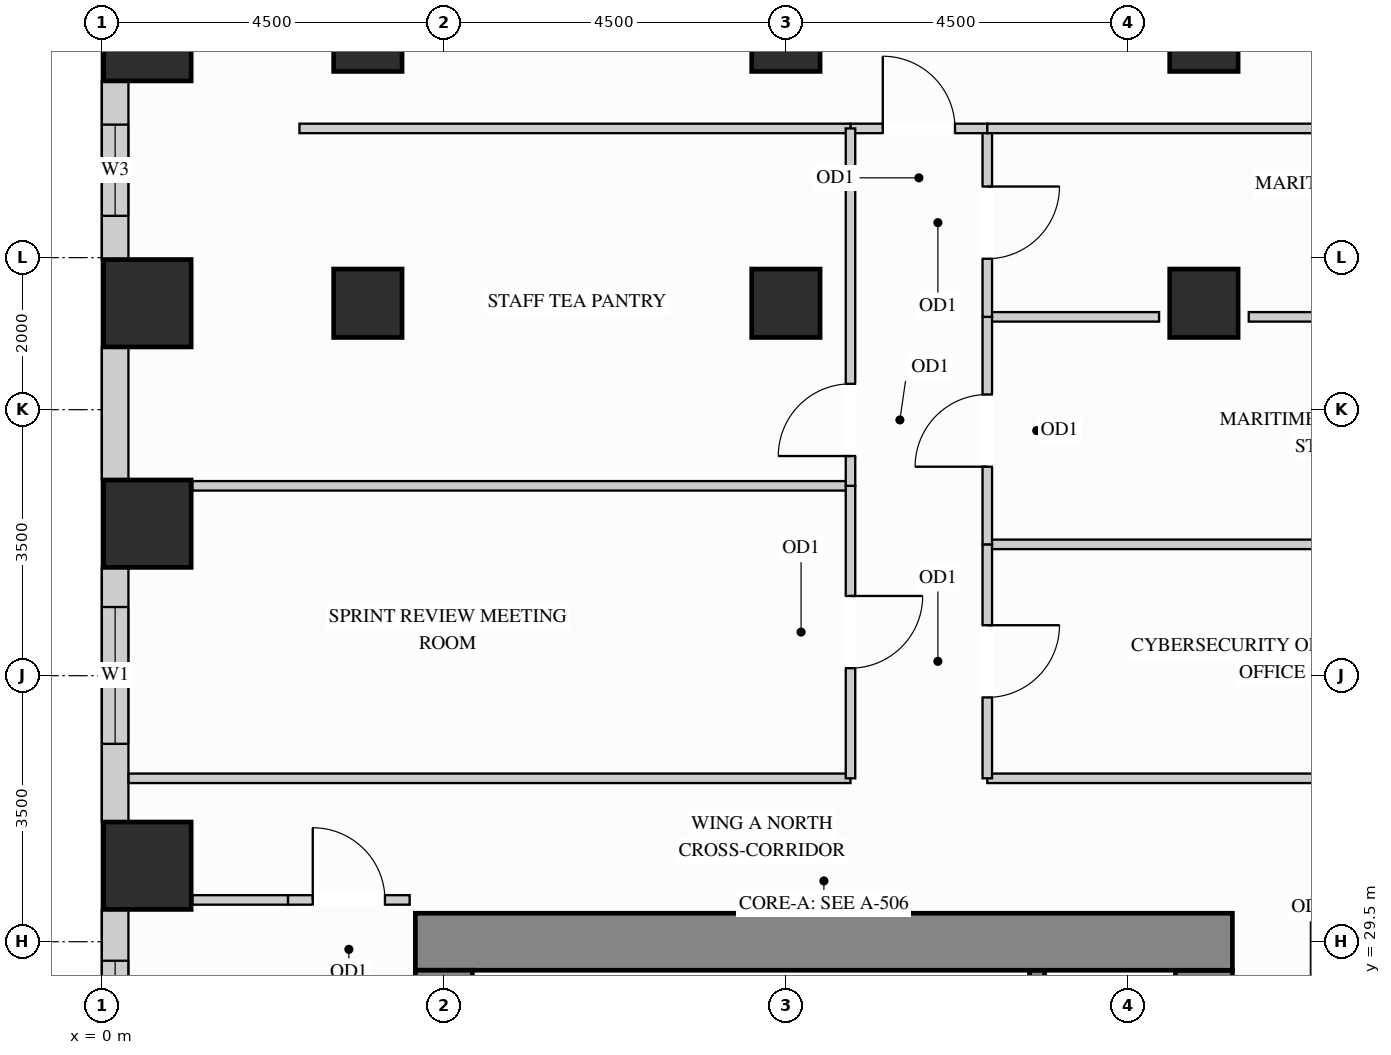
"""IFC4 building model, lengths in metres.
Left out: names, types, materials, properties, quantities, classifications, styles, units other than length and angle.
Written with IfcOpenShell. Run it as: python <this file> out.ifc"""

import sys

from ifc_helpers import new_model, si_unit, direction, frame, frame_2d, origin, origin_2d, place, context, subcontext, project, spatial, rectangle, extrude, source, transform, mapped, element, fill, save


model = new_model("IFC4")
c1 = context("Model", 3, precision=1e-05, world=origin(), true_north=direction((0.0, 1.0)))
c2 = subcontext(c1, "Body", "Model", "MODEL_VIEW")
j1 = project(units=[si_unit("LENGTHUNIT", "METRE"), si_unit("PLANEANGLEUNIT", "RADIAN")], contexts=[c1])
p1 = place(None, origin())
s1 = spatial("IfcSite", under=j1, at=p1, CompositionType="ELEMENT")
p2 = place(p1, origin())
s2 = spatial("IfcBuilding", under=s1, at=p2, CompositionType="ELEMENT")
p3 = place(p2, frame((0.0, 0.0, 127.8)))
s3 = spatial("IfcBuildingStorey", under=s2, at=p3, CompositionType="ELEMENT", Elevation=127.8)
m1 = source(origin(), c2, "Body", "SweptSolid", [
    extrude(rectangle(XDim=0.9, YDim=0.9, at=origin_2d()), origin(), (0.0, 0.0, 1.0), 3.38),
])
for number, where, z_axis, x_axis in (
    (1, (14.5, 37.9, 0.0), (0.0, 0.0, 1.0), (1.0, 0.0, 0.0)),
    (2, (14.5, 41.4, 0.0), (0.0, 0.0, 1.0), (1.0, 0.0, 0.0)),
    (3, (3.5, 37.9, 0.0), (0.0, 0.0, 1.0), (1.0, 0.0, 0.0)),
    (4, (3.5, 41.4, 0.0), (0.0, 0.0, 1.0), (1.0, 0.0, 0.0)),
    (5, (9.0, 37.9, 0.0), (0.0, 0.0, 1.0), (1.0, 0.0, 0.0)),
    (6, (9.0, 41.4, 0.0), (0.0, 0.0, 1.0), (1.0, 0.0, 0.0)),
):
    element("IfcColumn", number, at=place(p3, frame(where, z_axis=z_axis, x_axis=x_axis)), inside=s3, PredefinedType="COLUMN", context=c2, shape_type="MappedRepresentation", body=[
        mapped(m1, transform((0.0, 0.0, 0.0), x_axis=(1.0, 0.0, 0.0), y_axis=(0.0, 1.0, 0.0), z_axis=(0.0, 0.0, 1.0))),
    ])
m2 = source(origin(), c2, "Body", "SweptSolid", [
    extrude(rectangle(XDim=1.15, YDim=1.15, at=origin_2d()), origin(), (0.0, 0.0, 1.0), 3.38),
])
for number, where, z_axis, x_axis in (
    (7, (0.6, 30.5, 0.0), (0.0, 0.0, 1.0), (1.0, 0.0, 0.0)),
    (8, (0.6, 35.0, 0.0), (0.0, 0.0, 1.0), (1.0, 0.0, 0.0)),
    (9, (0.6, 37.9, 0.0), (0.0, 0.0, 1.0), (1.0, 0.0, 0.0)),
    (10, (0.6, 41.4, 0.0), (0.0, 0.0, 1.0), (1.0, 0.0, 0.0)),
):
    element("IfcColumn", number, at=place(p3, frame(where, z_axis=z_axis, x_axis=x_axis)), inside=s3, PredefinedType="COLUMN", context=c2, shape_type="MappedRepresentation", body=[
        mapped(m2, transform((0.0, 0.0, 0.0), x_axis=(1.0, 0.0, 0.0), y_axis=(0.0, 1.0, 0.0), z_axis=(0.0, 0.0, 1.0))),
    ])
m3 = source(origin(), c2, "Body", "SweptSolid", [
    extrude(rectangle(XDim=8.245, YDim=0.75, at=frame_2d((4.123, 0.0))), origin(), (0.0, 0.0, 1.0), 3.38),
])
p4 = place(p3, frame((14.5, 20.88, 0.0), z_axis=(0.0, 0.0, 1.0), x_axis=(0.0, 1.0, 0.0)))
e11 = element("IfcWall", 11, at=p4, inside=s3, PredefinedType="SHEAR", context=c2, shape_type="MappedRepresentation", body=[
    mapped(m3, transform((0.0, 0.0, 0.0), x_axis=(1.0, 0.0, 0.0), y_axis=(0.0, 1.0, 0.0), z_axis=(0.0, 0.0, 1.0))),
])
m4 = source(origin(), c2, "Body", "SweptSolid", [
    extrude(rectangle(XDim=10.75, YDim=0.75, at=frame_2d((5.375, 0.0))), origin(), (0.0, 0.0, 1.0), 3.38),
])
p5 = place(p3, frame((4.125, 29.5, 0.0), z_axis=(0.0, 0.0, 1.0), x_axis=(1.0, 0.0, 0.0)))
e12 = element("IfcWall", 12, at=p5, inside=s3, PredefinedType="SHEAR", context=c2, shape_type="MappedRepresentation", body=[
    mapped(m4, transform((0.0, 0.0, 0.0), x_axis=(1.0, 0.0, 0.0), y_axis=(0.0, 1.0, 0.0), z_axis=(0.0, 0.0, 1.0))),
])
m5 = source(origin(), c2, "Body", "SweptSolid", [
    extrude(rectangle(XDim=20.25, YDim=0.75, at=frame_2d((10.125, 0.0))), origin(), (0.0, 0.0, 1.0), 3.38),
])
p6 = place(p3, frame((4.5, 8.875, 0.0), z_axis=(0.0, 0.0, 1.0), x_axis=(0.0, 1.0, 0.0)))
e13 = element("IfcWall", 13, at=p6, inside=s3, PredefinedType="SHEAR", context=c2, shape_type="MappedRepresentation", body=[
    mapped(m5, transform((0.0, 0.0, 0.0), x_axis=(1.0, 0.0, 0.0), y_axis=(0.0, 1.0, 0.0), z_axis=(0.0, 0.0, 1.0))),
])
p7 = place(p3, frame((0.175, 40.827, 0.0), z_axis=(0.0, 0.0, 1.0), x_axis=(0.0, -1.0, 0.0)))
e14 = element("IfcWall", 14, at=p7, inside=s3, PredefinedType="SOLIDWALL", context=c2, shape_type="SweptSolid", body=[
    extrude(rectangle(XDim=2.354, YDim=0.35, at=frame_2d((1.177, 0.0))), origin(), (0.0, 0.0, 1.0), 3.365),
])
p8 = place(p7, frame((0.577, 0.0, 0.78)))
e15 = element("IfcOpeningElement", 15, at=p8, cuts=e14, PredefinedType="OPENING", context=c2, shape_type="SweptSolid", body=[
    extrude(rectangle(XDim=1.2, YDim=2.1, at=frame_2d((0.6, 1.05))), frame((0.0, 0.185, 0.0), z_axis=(0.0, -1.0, 0.0), x_axis=(1.0, 0.0, 0.0)), (0.0, 0.0, 1.0), 0.37),
])
m6 = source(origin(), c2, "Body", "SweptSolid", [
    extrude(rectangle(XDim=1.754, YDim=0.35, at=frame_2d((0.877, 0.0))), origin(), (0.0, 0.0, 1.0), 3.365),
])
p9 = place(p3, frame((0.175, 37.327, 0.0), z_axis=(0.0, 0.0, 1.0), x_axis=(0.0, -1.0, 0.0)))
e16 = element("IfcWall", 16, at=p9, inside=s3, PredefinedType="SOLIDWALL", context=c2, shape_type="MappedRepresentation", body=[
    mapped(m6, transform((0.0, 0.0, 0.0), x_axis=(1.0, 0.0, 0.0), y_axis=(0.0, 1.0, 0.0), z_axis=(0.0, 0.0, 1.0))),
])
p10 = place(p3, frame((0.175, 34.427, 0.0), z_axis=(0.0, 0.0, 1.0), x_axis=(0.0, -1.0, 0.0)))
e17 = element("IfcWall", 17, at=p10, inside=s3, PredefinedType="SOLIDWALL", context=c2, shape_type="SweptSolid", body=[
    extrude(rectangle(XDim=3.354, YDim=0.35, at=frame_2d((1.677, 0.0))), origin(), (0.0, 0.0, 1.0), 3.365),
])
p11 = place(p10, frame((0.523, 0.0, 0.78)))
e18 = element("IfcOpeningElement", 18, at=p11, cuts=e17, PredefinedType="OPENING", context=c2, shape_type="SweptSolid", body=[
    extrude(rectangle(XDim=1.8, YDim=2.1, at=frame_2d((0.9, 1.05))), frame((0.0, 0.185, 0.0), z_axis=(0.0, -1.0, 0.0), x_axis=(1.0, 0.0, 0.0)), (0.0, 0.0, 1.0), 0.37),
])
p12 = place(p3, frame((0.175, 29.927, 0.0), z_axis=(0.0, 0.0, 1.0), x_axis=(0.0, -1.0, 0.0)))
e19 = element("IfcWall", 19, at=p12, inside=s3, PredefinedType="SOLIDWALL", context=c2, shape_type="SweptSolid", body=[
    extrude(rectangle(XDim=2.554, YDim=0.35, at=frame_2d((1.277, 0.0))), origin(), (0.0, 0.0, 1.0), 3.365),
])
p13 = place(p12, frame((0.677, 0.0, 0.78)))
e20 = element("IfcOpeningElement", 20, at=p13, cuts=e19, PredefinedType="OPENING", context=c2, shape_type="SweptSolid", body=[
    extrude(rectangle(XDim=1.2, YDim=2.1, at=frame_2d((0.6, 1.05))), frame((0.0, 0.185, 0.0), z_axis=(0.0, -1.0, 0.0), x_axis=(1.0, 0.0, 0.0)), (0.0, 0.0, 1.0), 0.37),
])
m7 = source(origin(), c2, "Body", "SweptSolid", [
    extrude(rectangle(XDim=6.76, YDim=0.125, at=frame_2d((3.38, 0.0))), origin(), (0.0, 0.0, 1.0), 3.365),
])
p14 = place(p3, frame((11.65, 34.728, 0.0), z_axis=(0.0, 0.0, 1.0), x_axis=(1.0, 0.0, 0.0)))
e21 = element("IfcWall", 21, at=p14, inside=s3, PredefinedType="PARTITIONING", context=c2, shape_type="MappedRepresentation", body=[
    mapped(m7, transform((0.0, 0.0, 0.0), x_axis=(1.0, 0.0, 0.0), y_axis=(0.0, 1.0, 0.0), z_axis=(0.0, 0.0, 1.0))),
])
m8 = source(origin(), c2, "Body", "SweptSolid", [
    extrude(rectangle(XDim=2.26, YDim=0.125, at=frame_2d((1.13, 0.0))), origin(), (0.0, 0.0, 1.0), 2.677),
])
p15 = place(p3, frame((11.65, 37.721, 0.0), z_axis=(0.0, 0.0, 1.0), x_axis=(1.0, 0.0, 0.0)))
e22 = element("IfcWall", 22, at=p15, inside=s3, PredefinedType="PARTITIONING", context=c2, shape_type="MappedRepresentation", body=[
    mapped(m8, transform((0.0, 0.0, 0.0), x_axis=(1.0, 0.0, 0.0), y_axis=(0.0, 1.0, 0.0), z_axis=(0.0, 0.0, 1.0))),
])
m9 = source(origin(), c2, "Body", "SweptSolid", [
    extrude(rectangle(XDim=3.32, YDim=0.125, at=frame_2d((1.66, 0.0))), origin(), (0.0, 0.0, 1.0), 2.677),
])
p16 = place(p3, frame((15.09, 37.721, 0.0), z_axis=(0.0, 0.0, 1.0), x_axis=(1.0, 0.0, 0.0)))
e23 = element("IfcWall", 23, at=p16, inside=s3, PredefinedType="PARTITIONING", context=c2, shape_type="MappedRepresentation", body=[
    mapped(m9, transform((0.0, 0.0, 0.0), x_axis=(1.0, 0.0, 0.0), y_axis=(0.0, 1.0, 0.0), z_axis=(0.0, 0.0, 1.0))),
])
m10 = source(origin(), c2, "Body", "SweptSolid", [
    extrude(rectangle(XDim=7.498, YDim=0.125, at=frame_2d((3.749, 0.0))), origin(), (0.0, 0.0, 1.0), 2.828),
])
p17 = place(p3, frame((11.65, 31.65, 0.0), z_axis=(0.0, 0.0, 1.0), x_axis=(1.0, 0.0, 0.0)))
e24 = element("IfcWall", 24, at=p17, inside=s3, PredefinedType="PARTITIONING", context=c2, shape_type="MappedRepresentation", body=[
    mapped(m10, transform((0.0, 0.0, 0.0), x_axis=(1.0, 0.0, 0.0), y_axis=(0.0, 1.0, 0.0), z_axis=(0.0, 0.0, 1.0))),
])
m11 = source(origin(), c2, "Body", "SweptSolid", [
    extrude(rectangle(XDim=9.498, YDim=0.125, at=frame_2d((4.749, 0.0))), origin(), (0.0, 0.0, 1.0), 2.828),
])
p18 = place(p3, frame((0.352, 31.65, 0.0), z_axis=(0.0, 0.0, 1.0), x_axis=(1.0, 0.0, 0.0)))
e25 = element("IfcWall", 25, at=p18, inside=s3, PredefinedType="PARTITIONING", context=c2, shape_type="MappedRepresentation", body=[
    mapped(m11, transform((0.0, 0.0, 0.0), x_axis=(1.0, 0.0, 0.0), y_axis=(0.0, 1.0, 0.0), z_axis=(0.0, 0.0, 1.0))),
])
m12 = source(origin(), c2, "Body", "SweptSolid", [
    extrude(rectangle(XDim=8.66, YDim=0.125, at=frame_2d((4.33, 0.0))), origin(), (0.0, 0.0, 1.0), 3.365),
])
p19 = place(p3, frame((1.19, 35.498, 0.0), z_axis=(0.0, 0.0, 1.0), x_axis=(1.0, 0.0, 0.0)))
e26 = element("IfcWall", 26, at=p19, inside=s3, PredefinedType="PARTITIONING", context=c2, shape_type="MappedRepresentation", body=[
    mapped(m12, transform((0.0, 0.0, 0.0), x_axis=(1.0, 0.0, 0.0), y_axis=(0.0, 1.0, 0.0), z_axis=(0.0, 0.0, 1.0))),
])
m13 = source(origin(), c2, "Body", "SweptSolid", [
    extrude(rectangle(XDim=1.26, YDim=0.125, at=frame_2d((0.63, 0.0))), origin(), (0.0, 0.0, 1.0), 3.365),
])
p20 = place(p3, frame((1.19, 30.05, 0.0), z_axis=(0.0, 0.0, 1.0), x_axis=(1.0, 0.0, 0.0)))
e27 = element("IfcWall", 27, at=p20, inside=s3, PredefinedType="PARTITIONING", context=c2, shape_type="MappedRepresentation", body=[
    mapped(m13, transform((0.0, 0.0, 0.0), x_axis=(1.0, 0.0, 0.0), y_axis=(0.0, 1.0, 0.0), z_axis=(0.0, 0.0, 1.0))),
])
p21 = place(p3, frame((2.45, 30.05, 0.0), z_axis=(0.0, 0.0, 1.0), x_axis=(1.0, 0.0, 0.0)))
e28 = element("IfcWall", 28, at=p21, inside=s3, PredefinedType="PARTITIONING", context=c2, shape_type="SweptSolid", body=[
    extrude(rectangle(XDim=1.6, YDim=0.125, at=frame_2d((0.8, 0.0))), origin(), (0.0, 0.0, 1.0), 3.365),
])
p22 = place(p21, frame((0.325, 0.0, 0.0)))
e29 = element("IfcOpeningElement", 29, at=p22, cuts=e28, PredefinedType="OPENING", context=c2, shape_type="SweptSolid", body=[
    extrude(rectangle(XDim=0.95, YDim=2.15, at=frame_2d((0.475, 1.075))), frame((0.0, 0.073, 0.0), z_axis=(0.0, -1.0, 0.0), x_axis=(1.0, 0.0, 0.0)), (0.0, 0.0, 1.0), 0.145),
])
p23 = place(p3, frame((11.65, 31.65, 0.0), z_axis=(0.0, 0.0, 1.0), x_axis=(0.0, 1.0, 0.0)))
e30 = element("IfcWall", 30, at=p23, inside=s3, PredefinedType="PARTITIONING", context=c2, shape_type="SweptSolid", body=[
    extrude(rectangle(XDim=3.078, YDim=0.125, at=frame_2d((1.539, 0.0))), origin(), (0.0, 0.0, 1.0), 3.365),
])
p24 = place(p23, frame((1.064, 0.0, 0.0)))
e31 = element("IfcOpeningElement", 31, at=p24, cuts=e30, PredefinedType="OPENING", context=c2, shape_type="SweptSolid", body=[
    extrude(rectangle(XDim=0.95, YDim=2.15, at=frame_2d((0.475, 1.075))), frame((0.0, 0.073, 0.0), z_axis=(0.0, -1.0, 0.0), x_axis=(1.0, 0.0, 0.0)), (0.0, 0.0, 1.0), 0.145),
])
p25 = place(p3, frame((11.65, 34.728, 0.0), z_axis=(0.0, 0.0, 1.0), x_axis=(0.0, 1.0, 0.0)))
e32 = element("IfcWall", 32, at=p25, inside=s3, PredefinedType="PARTITIONING", context=c2, shape_type="SweptSolid", body=[
    extrude(rectangle(XDim=2.993, YDim=0.125, at=frame_2d((1.497, 0.0))), origin(), (0.0, 0.0, 1.0), 3.365),
])
p26 = place(p25, frame((1.021, 0.0, 0.0)))
e33 = element("IfcOpeningElement", 33, at=p26, cuts=e32, PredefinedType="OPENING", context=c2, shape_type="SweptSolid", body=[
    extrude(rectangle(XDim=0.95, YDim=2.15, at=frame_2d((0.475, 1.075))), frame((0.0, 0.073, 0.0), z_axis=(0.0, -1.0, 0.0), x_axis=(1.0, 0.0, 0.0)), (0.0, 0.0, 1.0), 0.145),
])
p27 = place(p3, frame((11.65, 37.721, 0.0), z_axis=(0.0, 0.0, 1.0), x_axis=(0.0, 1.0, 0.0)))
e34 = element("IfcWall", 34, at=p27, inside=s3, PredefinedType="PARTITIONING", context=c2, shape_type="SweptSolid", body=[
    extrude(rectangle(XDim=2.479, YDim=0.125, at=frame_2d((1.24, 0.0))), origin(), (0.0, 0.0, 1.0), 3.365),
])
p28 = place(p27, frame((0.764, 0.0, 0.0)))
e35 = element("IfcOpeningElement", 35, at=p28, cuts=e34, PredefinedType="OPENING", context=c2, shape_type="SweptSolid", body=[
    extrude(rectangle(XDim=0.95, YDim=2.15, at=frame_2d((0.475, 1.075))), frame((0.0, 0.073, 0.0), z_axis=(0.0, -1.0, 0.0), x_axis=(1.0, 0.0, 0.0)), (0.0, 0.0, 1.0), 0.145),
])
p29 = place(p3, frame((9.85, 40.2, 0.0), z_axis=(0.0, 0.0, 1.0), x_axis=(1.0, 0.0, 0.0)))
e36 = element("IfcWall", 36, at=p29, inside=s3, PredefinedType="PARTITIONING", context=c2, shape_type="SweptSolid", body=[
    extrude(rectangle(XDim=1.8, YDim=0.125, at=frame_2d((0.9, 0.0))), origin(), (0.0, 0.0, 1.0), 3.365),
])
p30 = place(p29, frame((0.425, 0.0, 0.0)))
e37 = element("IfcOpeningElement", 37, at=p30, cuts=e36, PredefinedType="OPENING", context=c2, shape_type="SweptSolid", body=[
    extrude(rectangle(XDim=0.95, YDim=2.15, at=frame_2d((0.475, 1.075))), frame((0.0, 0.073, 0.0), z_axis=(0.0, -1.0, 0.0), x_axis=(1.0, 0.0, 0.0)), (0.0, 0.0, 1.0), 0.145),
])
m14 = source(origin(), c2, "Body", "SweptSolid", [
    extrude(rectangle(XDim=5.25, YDim=0.125, at=frame_2d((2.625, 0.0))), origin(), (0.0, 0.0, 1.0), 3.365),
])
p31 = place(p3, frame((11.65, 40.2, 0.0), z_axis=(0.0, 0.0, 1.0), x_axis=(1.0, 0.0, 0.0)))
e38 = element("IfcWall", 38, at=p31, inside=s3, PredefinedType="PARTITIONING", context=c2, shape_type="MappedRepresentation", body=[
    mapped(m14, transform((0.0, 0.0, 0.0), x_axis=(1.0, 0.0, 0.0), y_axis=(0.0, 1.0, 0.0), z_axis=(0.0, 0.0, 1.0))),
])
m15 = source(origin(), c2, "Body", "SweptSolid", [
    extrude(rectangle(XDim=7.25, YDim=0.125, at=frame_2d((3.625, 0.0))), origin(), (0.0, 0.0, 1.0), 3.365),
])
p32 = place(p3, frame((2.6, 40.2, 0.0), z_axis=(0.0, 0.0, 1.0), x_axis=(1.0, 0.0, 0.0)))
e39 = element("IfcWall", 39, at=p32, inside=s3, PredefinedType="PARTITIONING", context=c2, shape_type="MappedRepresentation", body=[
    mapped(m15, transform((0.0, 0.0, 0.0), x_axis=(1.0, 0.0, 0.0), y_axis=(0.0, 1.0, 0.0), z_axis=(0.0, 0.0, 1.0))),
])
p33 = place(p3, frame((9.85, 31.65, 0.0), z_axis=(0.0, 0.0, 1.0), x_axis=(0.0, 1.0, 0.0)))
e40 = element("IfcWall", 40, at=p33, inside=s3, PredefinedType="PARTITIONING", context=c2, shape_type="SweptSolid", body=[
    extrude(rectangle(XDim=3.848, YDim=0.125, at=frame_2d((1.924, 0.0))), origin(), (0.0, 0.0, 1.0), 3.365),
])
p34 = place(p33, frame((1.449, 0.0, 0.0)))
e41 = element("IfcOpeningElement", 41, at=p34, cuts=e40, PredefinedType="OPENING", context=c2, shape_type="SweptSolid", body=[
    extrude(rectangle(XDim=0.95, YDim=2.15, at=frame_2d((0.475, 1.075))), frame((0.0, 0.073, 0.0), z_axis=(0.0, -1.0, 0.0), x_axis=(1.0, 0.0, 0.0)), (0.0, 0.0, 1.0), 0.145),
])
p35 = place(p3, frame((9.85, 35.498, 0.0), z_axis=(0.0, 0.0, 1.0), x_axis=(0.0, 1.0, 0.0)))
e42 = element("IfcWall", 42, at=p35, inside=s3, PredefinedType="PARTITIONING", context=c2, shape_type="SweptSolid", body=[
    extrude(rectangle(XDim=4.702, YDim=0.125, at=frame_2d((2.351, 0.0))), origin(), (0.0, 0.0, 1.0), 3.365),
])
p36 = place(p35, frame((0.392, 0.0, 0.0)))
e43 = element("IfcOpeningElement", 43, at=p36, cuts=e42, PredefinedType="OPENING", context=c2, shape_type="SweptSolid", body=[
    extrude(rectangle(XDim=0.95, YDim=2.15, at=frame_2d((0.475, 1.075))), frame((0.0, 0.073, 0.0), z_axis=(0.0, -1.0, 0.0), x_axis=(1.0, 0.0, 0.0)), (0.0, 0.0, 1.0), 0.145),
])
m16 = source(origin(), c2, "Body", "SweptSolid", [
    extrude(rectangle(XDim=3.678, YDim=0.2, at=frame_2d((1.839, 0.0))), origin(), (0.0, 0.0, 1.0), 3.38),
])
p37 = place(p3, frame((12.305, 25.445, 0.0), z_axis=(0.0, 0.0, 1.0), x_axis=(0.0, 1.0, 0.0)))
e44 = element("IfcWall", 44, at=p37, inside=s3, PredefinedType="SHEAR", context=c2, shape_type="MappedRepresentation", body=[
    mapped(m16, transform((0.0, 0.0, 0.0), x_axis=(1.0, 0.0, 0.0), y_axis=(0.0, 1.0, 0.0), z_axis=(0.0, 0.0, 1.0))),
])
m17 = source(origin(), c2, "Body", "SweptSolid", [
    extrude(rectangle(XDim=0.95, YDim=2.15, at=frame_2d((0.475, 1.075))), frame((0.0, 0.025, 0.0), z_axis=(0.0, -1.0, 0.0), x_axis=(1.0, 0.0, 0.0)), (0.0, 0.0, 1.0), 0.05),
])
p38 = place(p24, origin())
e45 = element("IfcDoor", 45, at=p38, inside=s3, OperationType="SINGLE_SWING_RIGHT", PredefinedType="DOOR", context=c2, shape_type="MappedRepresentation", body=[
    mapped(m17, transform((0.0, 0.0, 0.0), x_axis=(1.0, 0.0, 0.0), y_axis=(0.0, 1.0, 0.0), z_axis=(0.0, 0.0, 1.0))),
])
fill(e31, e45)
p39 = place(p26, origin())
e46 = element("IfcDoor", 46, at=p39, inside=s3, OperationType="SINGLE_SWING_LEFT", PredefinedType="DOOR", context=c2, shape_type="MappedRepresentation", body=[
    mapped(m17, transform((0.0, 0.0, 0.0), x_axis=(1.0, 0.0, 0.0), y_axis=(0.0, 1.0, 0.0), z_axis=(0.0, 0.0, 1.0))),
])
fill(e33, e46)
p40 = place(p28, origin())
e47 = element("IfcDoor", 47, at=p40, inside=s3, OperationType="SINGLE_SWING_RIGHT", PredefinedType="DOOR", context=c2, shape_type="MappedRepresentation", body=[
    mapped(m17, transform((0.0, 0.0, 0.0), x_axis=(1.0, 0.0, 0.0), y_axis=(0.0, 1.0, 0.0), z_axis=(0.0, 0.0, 1.0))),
])
fill(e35, e47)
p41 = place(p30, origin())
e48 = element("IfcDoor", 48, at=p41, inside=s3, OperationType="SINGLE_SWING_LEFT", PredefinedType="DOOR", context=c2, shape_type="MappedRepresentation", body=[
    mapped(m17, transform((0.0, 0.0, 0.0), x_axis=(1.0, 0.0, 0.0), y_axis=(0.0, 1.0, 0.0), z_axis=(0.0, 0.0, 1.0))),
])
fill(e37, e48)
p42 = place(p34, origin())
e49 = element("IfcDoor", 49, at=p42, inside=s3, OperationType="SINGLE_SWING_RIGHT", PredefinedType="DOOR", context=c2, shape_type="MappedRepresentation", body=[
    mapped(m17, transform((0.0, 0.0, 0.0), x_axis=(1.0, 0.0, 0.0), y_axis=(0.0, 1.0, 0.0), z_axis=(0.0, 0.0, 1.0))),
])
fill(e41, e49)
p43 = place(p36, origin())
e50 = element("IfcDoor", 50, at=p43, inside=s3, OperationType="SINGLE_SWING_LEFT", PredefinedType="DOOR", context=c2, shape_type="MappedRepresentation", body=[
    mapped(m17, transform((0.0, 0.0, 0.0), x_axis=(1.0, 0.0, 0.0), y_axis=(0.0, 1.0, 0.0), z_axis=(0.0, 0.0, 1.0))),
])
fill(e43, e50)
p44 = place(p22, origin())
e51 = element("IfcDoor", 51, at=p44, inside=s3, OperationType="SINGLE_SWING_LEFT", PredefinedType="DOOR", context=c2, shape_type="MappedRepresentation", body=[
    mapped(m17, transform((0.0, 0.0, 0.0), x_axis=(1.0, 0.0, 0.0), y_axis=(0.0, 1.0, 0.0), z_axis=(0.0, 0.0, 1.0))),
])
fill(e29, e51)
m18 = source(origin(), c2, "Body", "SweptSolid", [
    extrude(rectangle(XDim=1.8, YDim=2.1, at=frame_2d((0.9, 1.05))), frame((0.0, 0.03, 0.0), z_axis=(0.0, -1.0, 0.0), x_axis=(1.0, 0.0, 0.0)), (0.0, 0.0, 1.0), 0.06),
])
p45 = place(p11, origin())
e52 = element("IfcWindow", 52, at=p45, inside=s3, PartitioningType="SINGLE_PANEL", PredefinedType="WINDOW", context=c2, shape_type="MappedRepresentation", body=[
    mapped(m18, transform((0.0, 0.0, 0.0), x_axis=(1.0, 0.0, 0.0), y_axis=(0.0, 1.0, 0.0), z_axis=(0.0, 0.0, 1.0))),
])
fill(e18, e52)
m19 = source(origin(), c2, "Body", "SweptSolid", [
    extrude(rectangle(XDim=1.2, YDim=2.1, at=frame_2d((0.6, 1.05))), frame((0.0, 0.03, 0.0), z_axis=(0.0, -1.0, 0.0), x_axis=(1.0, 0.0, 0.0)), (0.0, 0.0, 1.0), 0.06),
])
p46 = place(p8, origin())
e53 = element("IfcWindow", 53, at=p46, inside=s3, PartitioningType="SINGLE_PANEL", PredefinedType="WINDOW", context=c2, shape_type="MappedRepresentation", body=[
    mapped(m19, transform((0.0, 0.0, 0.0), x_axis=(1.0, 0.0, 0.0), y_axis=(0.0, 1.0, 0.0), z_axis=(0.0, 0.0, 1.0))),
])
fill(e15, e53)
p47 = place(p13, origin())
e54 = element("IfcWindow", 54, at=p47, inside=s3, PartitioningType="SINGLE_PANEL", PredefinedType="WINDOW", context=c2, shape_type="MappedRepresentation", body=[
    mapped(m19, transform((0.0, 0.0, 0.0), x_axis=(1.0, 0.0, 0.0), y_axis=(0.0, 1.0, 0.0), z_axis=(0.0, 0.0, 1.0))),
])
fill(e20, e54)
save(model, sys.argv[1])
